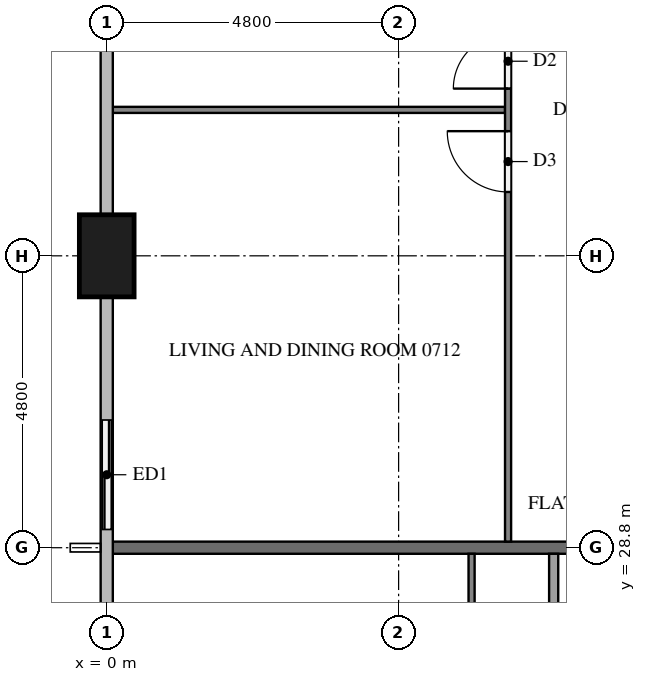
"""IFC4 building model, lengths in metres.
Left out: names, types, materials, properties, quantities, classifications, styles, units other than length and angle.
Written with IfcOpenShell. Run it as: python <this file> out.ifc"""

import sys

from ifc_helpers import new_model, si_unit, direction, frame, frame_2d, origin, origin_2d, place, context, subcontext, project, spatial, rectangle, extrude, element, fill, save


model = new_model("IFC4")
c1 = context("Model", 3, precision=1e-05, world=origin(), true_north=direction((0.0, 1.0)))
c2 = subcontext(c1, "Body", "Model", "MODEL_VIEW")
j1 = project(units=[si_unit("LENGTHUNIT", "METRE"), si_unit("PLANEANGLEUNIT", "RADIAN")], contexts=[c1])
p1 = place(None, origin())
s1 = spatial("IfcSite", under=j1, at=p1, CompositionType="ELEMENT")
p2 = place(p1, origin())
s2 = spatial("IfcBuilding", under=s1, at=p2, CompositionType="ELEMENT")
p3 = place(p2, frame((0.0, 0.0, 32.9)))
s3 = spatial("IfcBuildingStorey", under=s2, at=p3, CompositionType="ELEMENT", Elevation=32.9)
p4 = place(p3, frame((0.0, 33.6, 0.0), z_axis=(0.0, 0.0, 1.0), x_axis=(0.0, 1.0, 0.0)))
e1 = element("IfcColumn", 1, at=p4, inside=s3, PredefinedType="COLUMN", context=c2, shape_type="SweptSolid", body=[
    extrude(rectangle(XDim=1.35, YDim=0.9, at=origin_2d()), origin(), (0.0, 0.0, 1.0), 3.2),
])
p5 = place(p3, frame((0.0, 31.2, 0.0), z_axis=(0.0, 0.0, 1.0), x_axis=(0.0, -1.0, 0.0)))
e2 = element("IfcWall", 2, at=p5, inside=s3, PredefinedType="SOLIDWALL", context=c2, shape_type="SweptSolid", body=[
    extrude(rectangle(XDim=2.4, YDim=0.15, at=frame_2d((1.2, 0.0))), origin(), (0.0, 0.0, 1.0), 3.2),
])
p6 = place(p5, frame((0.3, 0.0, 0.0)))
e3 = element("IfcOpeningElement", 3, at=p6, cuts=e2, PredefinedType="OPENING", context=c2, shape_type="SweptSolid", body=[
    extrude(rectangle(XDim=1.8, YDim=2.4, at=frame_2d((0.9, 1.2))), frame((0.0, 0.085, 0.0), z_axis=(0.0, -1.0, 0.0), x_axis=(1.0, 0.0, 0.0)), (0.0, 0.0, 1.0), 0.17),
])
p7 = place(p3, frame((0.1, 28.8, 0.0), z_axis=(0.0, 0.0, 1.0), x_axis=(1.0, 0.0, 0.0)))
e4 = element("IfcWall", 4, at=p7, inside=s3, PredefinedType="PARTITIONING", context=c2, shape_type="SweptSolid", body=[
    extrude(rectangle(XDim=11.8, YDim=0.2, at=frame_2d((5.9, 0.0))), origin(), (0.0, 0.0, 1.0), 3.2),
])
p8 = place(p3, frame((6.55, 36.0, 0.0), z_axis=(0.0, 0.0, 1.0), x_axis=(-1.0, 0.0, 0.0)))
e5 = element("IfcWall", 5, at=p8, inside=s3, PredefinedType="PARTITIONING", context=c2, shape_type="SweptSolid", body=[
    extrude(rectangle(XDim=6.45, YDim=0.1, at=frame_2d((3.225, 0.0))), origin(), (0.0, 0.0, 1.0), 3.2),
])
p9 = place(p3, frame((6.6, 28.9, 0.0), z_axis=(0.0, 0.0, 1.0), x_axis=(0.0, 1.0, 0.0)))
e6 = element("IfcWall", 6, at=p9, inside=s3, PredefinedType="PARTITIONING", context=c2, shape_type="SweptSolid", body=[
    extrude(rectangle(XDim=11.8, YDim=0.1, at=frame_2d((5.9, 0.0))), origin(), (0.0, 0.0, 1.0), 3.2),
])
p10 = place(p9, frame((5.75, 0.0, 0.0)))
e7 = element("IfcOpeningElement", 7, at=p10, cuts=e6, PredefinedType="OPENING", context=c2, shape_type="SweptSolid", body=[
    extrude(rectangle(XDim=1.0, YDim=2.1, at=frame_2d((0.5, 1.05))), frame((0.0, 0.06, 0.0), z_axis=(0.0, -1.0, 0.0), x_axis=(1.0, 0.0, 0.0)), (0.0, 0.0, 1.0), 0.12),
])
p11 = place(p9, frame((7.45, 0.0, 0.0)))
e8 = element("IfcOpeningElement", 8, at=p11, cuts=e6, PredefinedType="OPENING", context=c2, shape_type="SweptSolid", body=[
    extrude(rectangle(XDim=0.9, YDim=2.1, at=frame_2d((0.45, 1.05))), frame((0.0, 0.06, 0.0), z_axis=(0.0, -1.0, 0.0), x_axis=(1.0, 0.0, 0.0)), (0.0, 0.0, 1.0), 0.12),
])
p12 = place(p3, frame((6.0, 12.1, 0.0), z_axis=(0.0, 0.0, 1.0), x_axis=(0.0, 1.0, 0.0)))
e9 = element("IfcWall", 9, at=p12, inside=s3, PredefinedType="PARTITIONING", context=c2, shape_type="SweptSolid", body=[
    extrude(rectangle(XDim=16.6, YDim=0.1, at=frame_2d((8.3, 0.0))), origin(), (0.0, 0.0, 1.0), 3.2),
])
p13 = place(p12, frame((0.3, 0.0, 0.0)))
e10 = element("IfcOpeningElement", 10, at=p13, cuts=e9, PredefinedType="OPENING", context=c2, shape_type="SweptSolid", body=[
    extrude(rectangle(XDim=1.0, YDim=2.1, at=frame_2d((0.5, 1.05))), frame((0.0, 0.06, 0.0), z_axis=(0.0, -1.0, 0.0), x_axis=(1.0, 0.0, 0.0)), (0.0, 0.0, 1.0), 0.12),
])
p14 = place(p12, frame((10.65, 0.0, 0.0)))
e11 = element("IfcOpeningElement", 11, at=p14, cuts=e9, PredefinedType="OPENING", context=c2, shape_type="SweptSolid", body=[
    extrude(rectangle(XDim=0.9, YDim=2.1, at=frame_2d((0.45, 1.05))), frame((0.0, 0.06, 0.0), z_axis=(0.0, -1.0, 0.0), x_axis=(1.0, 0.0, 0.0)), (0.0, 0.0, 1.0), 0.12),
])
p15 = place(p12, frame((12.25, 0.0, 0.0)))
e12 = element("IfcOpeningElement", 12, at=p15, cuts=e9, PredefinedType="OPENING", context=c2, shape_type="SweptSolid", body=[
    extrude(rectangle(XDim=0.9, YDim=2.1, at=frame_2d((0.45, 1.05))), frame((0.0, 0.06, 0.0), z_axis=(0.0, -1.0, 0.0), x_axis=(1.0, 0.0, 0.0)), (0.0, 0.0, 1.0), 0.12),
])
p16 = place(p3, frame((7.35, 28.7, 0.0), z_axis=(0.0, 0.0, 1.0), x_axis=(0.0, -1.0, 0.0)))
e13 = element("IfcWall", 13, at=p16, inside=s3, PredefinedType="PARTITIONING", context=c2, shape_type="SweptSolid", body=[
    extrude(rectangle(XDim=15.125, YDim=0.15, at=frame_2d((7.562, 0.0))), origin(), (0.0, 0.0, 1.0), 3.2),
])
p17 = place(p16, frame((13.925, 0.0, 0.0)))
e14 = element("IfcOpeningElement", 14, at=p17, cuts=e13, PredefinedType="OPENING", context=c2, shape_type="SweptSolid", body=[
    extrude(rectangle(XDim=0.9, YDim=2.1, at=frame_2d((0.45, 1.05))), frame((0.0, 0.085, 0.0), z_axis=(0.0, -1.0, 0.0), x_axis=(1.0, 0.0, 0.0)), (0.0, 0.0, 1.0), 0.17),
])
p18 = place(p16, frame((3.815, 0.0, 0.0)))
e15 = element("IfcOpeningElement", 15, at=p18, cuts=e13, PredefinedType="OPENING", context=c2, shape_type="SweptSolid", body=[
    extrude(rectangle(XDim=0.9, YDim=2.1, at=frame_2d((0.45, 1.05))), frame((0.0, 0.085, 0.0), z_axis=(0.0, -1.0, 0.0), x_axis=(1.0, 0.0, 0.0)), (0.0, 0.0, 1.0), 0.17),
])
p19 = place(p16, frame((2.365, 0.0, 0.0)))
e16 = element("IfcOpeningElement", 16, at=p19, cuts=e13, PredefinedType="OPENING", context=c2, shape_type="SweptSolid", body=[
    extrude(rectangle(XDim=0.8, YDim=2.1, at=frame_2d((0.4, 1.05))), frame((0.0, 0.085, 0.0), z_axis=(0.0, -1.0, 0.0), x_axis=(1.0, 0.0, 0.0)), (0.0, 0.0, 1.0), 0.17),
])
p20 = place(p6, origin())
e17 = element("IfcDoor", 17, at=p20, inside=s3, OperationType="SLIDING_TO_RIGHT", PredefinedType="DOOR", context=c2, shape_type="SweptSolid", body=[
    extrude(rectangle(XDim=1.8, YDim=2.4, at=frame_2d((0.9, 1.2))), frame((0.0, 0.025, 0.0), z_axis=(0.0, -1.0, 0.0), x_axis=(1.0, 0.0, 0.0)), (0.0, 0.0, 1.0), 0.05),
])
fill(e3, e17)
p21 = place(p10, origin())
e18 = element("IfcDoor", 18, at=p21, inside=s3, OperationType="SINGLE_SWING_RIGHT", PredefinedType="DOOR", context=c2, shape_type="SweptSolid", body=[
    extrude(rectangle(XDim=1.0, YDim=2.1, at=frame_2d((0.5, 1.05))), frame((0.0, 0.025, 0.0), z_axis=(0.0, -1.0, 0.0), x_axis=(1.0, 0.0, 0.0)), (0.0, 0.0, 1.0), 0.05),
])
fill(e7, e18)
p22 = place(p11, origin())
e19 = element("IfcDoor", 19, at=p22, inside=s3, OperationType="SINGLE_SWING_LEFT", PredefinedType="DOOR", context=c2, shape_type="SweptSolid", body=[
    extrude(rectangle(XDim=0.9, YDim=2.1, at=frame_2d((0.45, 1.05))), frame((0.0, 0.025, 0.0), z_axis=(0.0, -1.0, 0.0), x_axis=(1.0, 0.0, 0.0)), (0.0, 0.0, 1.0), 0.05),
])
fill(e8, e19)
save(model, sys.argv[1])
